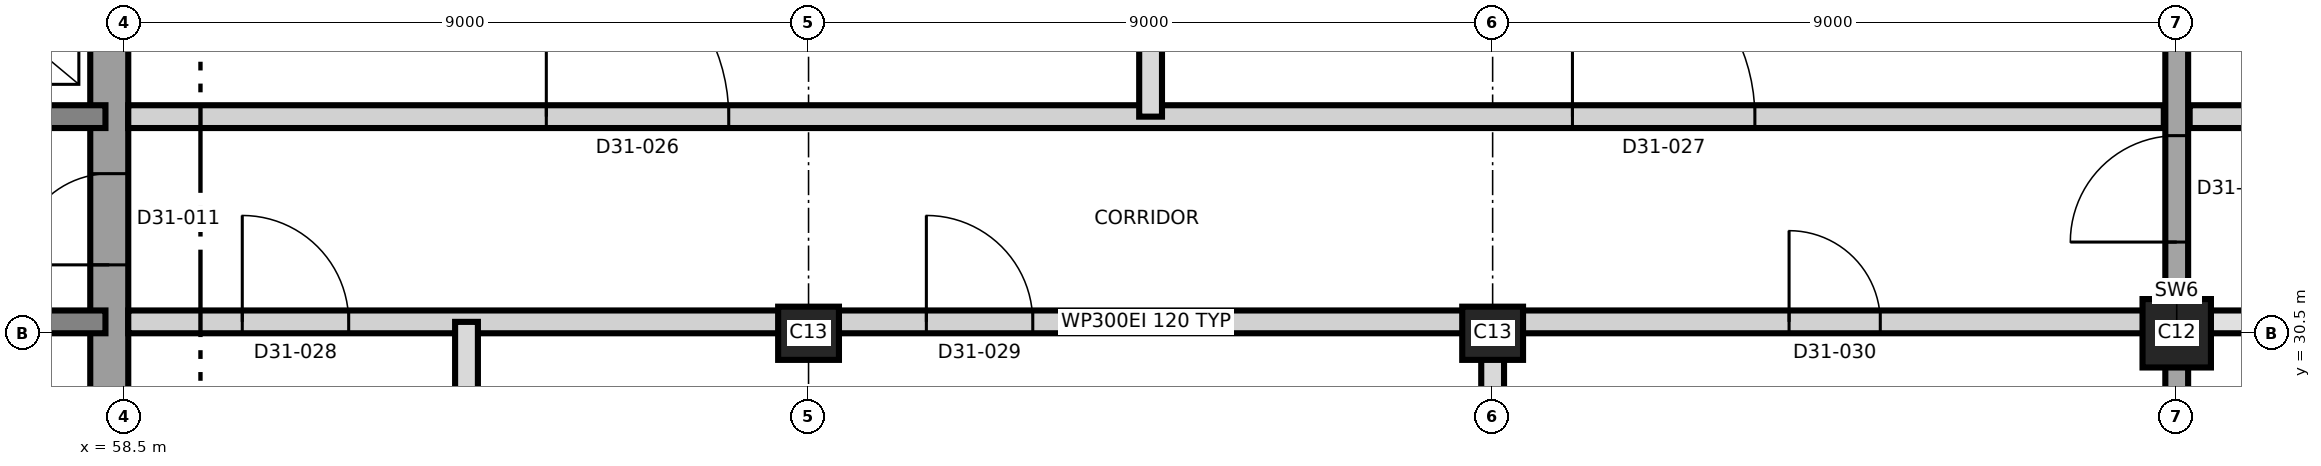
"""IFC4 building model, lengths in metres.
Left out: names, types, materials, properties, quantities, classifications, styles, units other than length and angle.
Written with IfcOpenShell. Run it as: python <this file> out.ifc"""

import sys

from ifc_helpers import new_model, si_unit, direction, frame, frame_2d, origin, origin_2d, place, context, subcontext, project, spatial, rectangle, extrude, element, fill, save


model = new_model("IFC4")
c1 = context("Model", 3, precision=1e-05, world=origin(), true_north=direction((0.0, 1.0)))
c2 = subcontext(c1, "Body", "Model", "MODEL_VIEW")
j1 = project(units=[si_unit("LENGTHUNIT", "METRE"), si_unit("PLANEANGLEUNIT", "RADIAN")], contexts=[c1])
p1 = place(None, origin())
s1 = spatial("IfcSite", under=j1, at=p1, CompositionType="ELEMENT")
p2 = place(p1, origin())
s2 = spatial("IfcBuilding", under=s1, at=p2, CompositionType="ELEMENT")
p3 = place(p2, frame((0.0, 0.0, 266.9)))
s3 = spatial("IfcBuildingStorey", under=s2, at=p3, CompositionType="ELEMENT", Elevation=266.9)
p4 = place(p3, frame((58.3, 21.25, 0.0), z_axis=(0.0, 0.0, 1.0), x_axis=(0.0, 1.0, 0.0)))
e1 = element("IfcWall", 1, at=p4, inside=s3, PredefinedType="SHEAR", context=c2, shape_type="SweptSolid", body=[
    extrude(rectangle(XDim=18.5, YDim=0.5, at=frame_2d((9.25, 0.0))), origin(), (0.0, 0.0, 1.0), 6.0),
])
p5 = place(p4, frame((10.15, 0.0, 0.0)))
e2 = element("IfcOpeningElement", 2, at=p5, cuts=e1, PredefinedType="OPENING", context=c2, shape_type="SweptSolid", body=[
    extrude(rectangle(XDim=1.2, YDim=2.1, at=frame_2d((0.6, 1.05))), frame((0.0, 0.26, 0.0), z_axis=(0.0, -1.0, 0.0), x_axis=(1.0, 0.0, 0.0)), (0.0, 0.0, 1.0), 0.52),
])
p6 = place(p3, frame((31.75, 30.65, 0.0), z_axis=(0.0, 0.0, 1.0), x_axis=(1.0, 0.0, 0.0)))
e3 = element("IfcWall", 3, at=p6, inside=s3, PredefinedType="SHEAR", context=c2, shape_type="SweptSolid", body=[
    extrude(rectangle(XDim=26.5, YDim=0.3, at=frame_2d((13.25, 0.0))), origin(), (0.0, 0.0, 1.0), 6.0),
])
p7 = place(p6, frame((24.75, 0.0, 0.0)))
e4 = element("IfcOpeningElement", 4, at=p7, cuts=e3, PredefinedType="OPENING", context=c2, shape_type="SweptSolid", body=[
    extrude(rectangle(XDim=1.0, YDim=2.1, at=frame_2d((0.5, 1.05))), frame((0.0, 0.16, 0.0), z_axis=(0.0, -1.0, 0.0), x_axis=(1.0, 0.0, 0.0)), (0.0, 0.0, 1.0), 0.32),
])
p8 = place(p6, frame((4.05, 0.0, 0.0)))
e5 = element("IfcOpeningElement", 5, at=p8, cuts=e3, PredefinedType="OPENING", context=c2, shape_type="SweptSolid", body=[
    extrude(rectangle(XDim=1.0, YDim=2.1, at=frame_2d((0.5, 1.05))), frame((0.0, 0.16, 0.0), z_axis=(0.0, -1.0, 0.0), x_axis=(1.0, 0.0, 0.0)), (0.0, 0.0, 1.0), 0.32),
])
p9 = place(p6, frame((11.55, 0.0, 0.0)))
e6 = element("IfcOpeningElement", 6, at=p9, cuts=e3, PredefinedType="OPENING", context=c2, shape_type="SweptSolid", body=[
    extrude(rectangle(XDim=1.0, YDim=2.1, at=frame_2d((0.5, 1.05))), frame((0.0, 0.16, 0.0), z_axis=(0.0, -1.0, 0.0), x_axis=(1.0, 0.0, 0.0)), (0.0, 0.0, 1.0), 0.32),
])
p10 = place(p3, frame((31.75, 33.35, 0.0), z_axis=(0.0, 0.0, 1.0), x_axis=(1.0, 0.0, 0.0)))
e7 = element("IfcWall", 7, at=p10, inside=s3, PredefinedType="SHEAR", context=c2, shape_type="SweptSolid", body=[
    extrude(rectangle(XDim=26.5, YDim=0.3, at=frame_2d((13.25, 0.0))), origin(), (0.0, 0.0, 1.0), 6.0),
])
p11 = place(p10, frame((13.9, 0.0, 0.0)))
e8 = element("IfcOpeningElement", 8, at=p11, cuts=e7, PredefinedType="OPENING", context=c2, shape_type="SweptSolid", body=[
    extrude(rectangle(XDim=1.4, YDim=2.1, at=frame_2d((0.7, 1.05))), frame((0.0, 0.16, 0.0), z_axis=(0.0, -1.0, 0.0), x_axis=(1.0, 0.0, 0.0)), (0.0, 0.0, 1.0), 0.32),
])
p12 = place(p10, frame((5.375, 0.0, 0.0)))
e9 = element("IfcOpeningElement", 9, at=p12, cuts=e7, PredefinedType="OPENING", context=c2, shape_type="SweptSolid", body=[
    extrude(rectangle(XDim=1.2, YDim=2.1, at=frame_2d((0.6, 1.05))), frame((0.0, 0.16, 0.0), z_axis=(0.0, -1.0, 0.0), x_axis=(1.0, 0.0, 0.0)), (0.0, 0.0, 1.0), 0.32),
])
p13 = place(p10, frame((19.925, 0.0, 0.0)))
e10 = element("IfcOpeningElement", 10, at=p13, cuts=e7, PredefinedType="OPENING", context=c2, shape_type="SweptSolid", body=[
    extrude(rectangle(XDim=1.2, YDim=2.1, at=frame_2d((0.6, 1.05))), frame((0.0, 0.16, 0.0), z_axis=(0.0, -1.0, 0.0), x_axis=(1.0, 0.0, 0.0)), (0.0, 0.0, 1.0), 0.32),
])
for number, where, z_axis, x_axis in (
    (11, (67.5, 30.5, 0.0), (0.0, 0.0, 1.0), (1.0, 0.0, 0.0)),
    (12, (76.5, 30.5, 0.0), (0.0, 0.0, 1.0), (1.0, 0.0, 0.0)),
):
    element("IfcColumn", number, at=place(p3, frame(where, z_axis=z_axis, x_axis=x_axis)), inside=s3, PredefinedType="COLUMN", context=c2, shape_type="SweptSolid", body=[
        extrude(rectangle(XDim=0.8, YDim=0.7, at=origin_2d()), origin(), (0.0, 0.0, 1.0), 6.0),
    ])
p14 = place(p3, frame((85.5, 30.5, 0.0), z_axis=(0.0, 0.0, 1.0), x_axis=(1.0, 0.0, 0.0)))
e13 = element("IfcColumn", 13, at=p14, inside=s3, PredefinedType="COLUMN", context=c2, shape_type="SweptSolid", body=[
    extrude(rectangle(XDim=0.9, YDim=0.9, at=origin_2d()), origin(), (0.0, 0.0, 1.0), 6.0),
])
p15 = place(p3, frame((85.5, 20.75, 0.0), z_axis=(0.0, 0.0, 1.0), x_axis=(0.0, 1.0, 0.0)))
e14 = element("IfcWall", 14, at=p15, inside=s3, PredefinedType="SHEAR", context=c2, shape_type="SweptSolid", body=[
    extrude(rectangle(XDim=19.5, YDim=0.3, at=frame_2d((9.75, 0.0))), origin(), (0.0, 0.0, 1.0), 6.0),
])
p16 = place(p15, frame((10.95, 0.0, 0.0)))
e15 = element("IfcOpeningElement", 15, at=p16, cuts=e14, PredefinedType="OPENING", context=c2, shape_type="SweptSolid", body=[
    extrude(rectangle(XDim=1.4, YDim=2.1, at=frame_2d((0.7, 1.05))), frame((0.0, 0.16, 0.0), z_axis=(0.0, -1.0, 0.0), x_axis=(1.0, 0.0, 0.0)), (0.0, 0.0, 1.0), 0.32),
])
p17 = place(p3, frame((58.55, 30.65, 0.0), z_axis=(0.0, 0.0, 1.0), x_axis=(1.0, 0.0, 0.0)))
e16 = element("IfcWall", 16, at=p17, inside=s3, PredefinedType="PARTITIONING", context=c2, shape_type="SweptSolid", body=[
    extrude(rectangle(XDim=26.78, YDim=0.3, at=frame_2d((13.39, 0.0))), origin(), (0.0, 0.0, 1.0), 5.7),
])
p18 = place(p17, frame((1.5, 0.0, 0.0)))
e17 = element("IfcOpeningElement", 17, at=p18, cuts=e16, PredefinedType="OPENING", context=c2, shape_type="SweptSolid", body=[
    extrude(rectangle(XDim=1.4, YDim=2.1, at=frame_2d((0.7, 1.05))), frame((0.0, 0.16, 0.0), z_axis=(0.0, -1.0, 0.0), x_axis=(1.0, 0.0, 0.0)), (0.0, 0.0, 1.0), 0.32),
])
p19 = place(p17, frame((10.5, 0.0, 0.0)))
e18 = element("IfcOpeningElement", 18, at=p19, cuts=e16, PredefinedType="OPENING", context=c2, shape_type="SweptSolid", body=[
    extrude(rectangle(XDim=1.4, YDim=2.1, at=frame_2d((0.7, 1.05))), frame((0.0, 0.16, 0.0), z_axis=(0.0, -1.0, 0.0), x_axis=(1.0, 0.0, 0.0)), (0.0, 0.0, 1.0), 0.32),
])
p20 = place(p17, frame((21.85, 0.0, 0.0)))
e19 = element("IfcOpeningElement", 19, at=p20, cuts=e16, PredefinedType="OPENING", context=c2, shape_type="SweptSolid", body=[
    extrude(rectangle(XDim=1.2, YDim=2.1, at=frame_2d((0.6, 1.05))), frame((0.0, 0.16, 0.0), z_axis=(0.0, -1.0, 0.0), x_axis=(1.0, 0.0, 0.0)), (0.0, 0.0, 1.0), 0.32),
])
p21 = place(p3, frame((85.67, 30.65, 0.0), z_axis=(0.0, 0.0, 1.0), x_axis=(1.0, 0.0, 0.0)))
e20 = element("IfcWall", 20, at=p21, inside=s3, PredefinedType="SOLIDWALL", context=c2, shape_type="SweptSolid", body=[
    extrude(rectangle(XDim=9.76, YDim=0.3, at=frame_2d((4.88, 0.0))), origin(), (0.0, 0.0, 1.0), 5.7),
])
p22 = place(p21, frame((2.08, 0.0, 0.0)))
e21 = element("IfcOpeningElement", 21, at=p22, cuts=e20, PredefinedType="OPENING", context=c2, shape_type="SweptSolid", body=[
    extrude(rectangle(XDim=1.2, YDim=2.1, at=frame_2d((0.6, 1.05))), frame((0.0, 0.16, 0.0), z_axis=(0.0, -1.0, 0.0), x_axis=(1.0, 0.0, 0.0)), (0.0, 0.0, 1.0), 0.32),
])
p23 = place(p21, frame((5.63, 0.0, 0.0)))
e22 = element("IfcOpeningElement", 22, at=p23, cuts=e20, PredefinedType="OPENING", context=c2, shape_type="SweptSolid", body=[
    extrude(rectangle(XDim=1.0, YDim=2.1, at=frame_2d((0.5, 1.05))), frame((0.0, 0.16, 0.0), z_axis=(0.0, -1.0, 0.0), x_axis=(1.0, 0.0, 0.0)), (0.0, 0.0, 1.0), 0.32),
])
p24 = place(p3, frame((58.55, 33.35, 0.0), z_axis=(0.0, 0.0, 1.0), x_axis=(1.0, 0.0, 0.0)))
e23 = element("IfcWall", 23, at=p24, inside=s3, PredefinedType="PARTITIONING", context=c2, shape_type="SweptSolid", body=[
    extrude(rectangle(XDim=26.78, YDim=0.3, at=frame_2d((13.39, 0.0))), origin(), (0.0, 0.0, 1.0), 5.7),
])
p25 = place(p24, frame((5.5, 0.0, 0.0)))
e24 = element("IfcOpeningElement", 24, at=p25, cuts=e23, PredefinedType="OPENING", context=c2, shape_type="SweptSolid", body=[
    extrude(rectangle(XDim=2.4, YDim=2.4, at=frame_2d((1.2, 1.2))), frame((0.0, 0.16, 0.0), z_axis=(0.0, -1.0, 0.0), x_axis=(1.0, 0.0, 0.0)), (0.0, 0.0, 1.0), 0.32),
])
p26 = place(p24, frame((19.0, 0.0, 0.0)))
e25 = element("IfcOpeningElement", 25, at=p26, cuts=e23, PredefinedType="OPENING", context=c2, shape_type="SweptSolid", body=[
    extrude(rectangle(XDim=2.4, YDim=2.4, at=frame_2d((1.2, 1.2))), frame((0.0, 0.16, 0.0), z_axis=(0.0, -1.0, 0.0), x_axis=(1.0, 0.0, 0.0)), (0.0, 0.0, 1.0), 0.32),
])
p27 = place(p3, frame((85.67, 33.35, 0.0), z_axis=(0.0, 0.0, 1.0), x_axis=(1.0, 0.0, 0.0)))
e26 = element("IfcWall", 26, at=p27, inside=s3, PredefinedType="PARTITIONING", context=c2, shape_type="SweptSolid", body=[
    extrude(rectangle(XDim=9.724, YDim=0.3, at=frame_2d((4.862, 0.0))), origin(), (0.0, 0.0, 1.0), 5.7),
])
p28 = place(p27, frame((1.83, 0.0, 0.0)))
e27 = element("IfcOpeningElement", 27, at=p28, cuts=e26, PredefinedType="OPENING", context=c2, shape_type="SweptSolid", body=[
    extrude(rectangle(XDim=1.0, YDim=2.1, at=frame_2d((0.5, 1.05))), frame((0.0, 0.16, 0.0), z_axis=(0.0, -1.0, 0.0), x_axis=(1.0, 0.0, 0.0)), (0.0, 0.0, 1.0), 0.32),
])
p29 = place(p27, frame((5.63, 0.0, 0.0)))
e28 = element("IfcOpeningElement", 28, at=p29, cuts=e26, PredefinedType="OPENING", context=c2, shape_type="SweptSolid", body=[
    extrude(rectangle(XDim=1.0, YDim=2.1, at=frame_2d((0.5, 1.05))), frame((0.0, 0.16, 0.0), z_axis=(0.0, -1.0, 0.0), x_axis=(1.0, 0.0, 0.0)), (0.0, 0.0, 1.0), 0.32),
])
p30 = place(p3, frame((63.0, 20.57, 0.0), z_axis=(0.0, 0.0, 1.0), x_axis=(0.0, 1.0, 0.0)))
e29 = element("IfcWall", 29, at=p30, inside=s3, PredefinedType="PARTITIONING", context=c2, shape_type="SweptSolid", body=[
    extrude(rectangle(XDim=10.08, YDim=0.3, at=frame_2d((5.04, 0.0))), origin(), (0.0, 0.0, 1.0), 5.7),
])
p31 = place(p3, frame((72.0, 33.35, 0.0), z_axis=(0.0, 0.0, 1.0), x_axis=(0.0, 1.0, 0.0)))
e30 = element("IfcWall", 30, at=p31, inside=s3, PredefinedType="PARTITIONING", context=c2, shape_type="SweptSolid", body=[
    extrude(rectangle(XDim=7.08, YDim=0.3, at=frame_2d((3.54, 0.0))), origin(), (0.0, 0.0, 1.0), 5.7),
])
p32 = place(p3, frame((76.5, 20.57, 0.0), z_axis=(0.0, 0.0, 1.0), x_axis=(0.0, 1.0, 0.0)))
e31 = element("IfcWall", 31, at=p32, inside=s3, PredefinedType="PARTITIONING", context=c2, shape_type="SweptSolid", body=[
    extrude(rectangle(XDim=10.08, YDim=0.3, at=frame_2d((5.04, 0.0))), origin(), (0.0, 0.0, 1.0), 5.7),
])
p33 = place(p5, origin())
e32 = element("IfcDoor", 32, at=p33, inside=s3, OperationType="SINGLE_SWING_LEFT", PredefinedType="DOOR", context=c2, shape_type="SweptSolid", body=[
    extrude(rectangle(XDim=1.2, YDim=2.1, at=frame_2d((0.6, 1.05))), frame((0.0, 0.025, 0.0), z_axis=(0.0, -1.0, 0.0), x_axis=(1.0, 0.0, 0.0)), (0.0, 0.0, 1.0), 0.05),
])
fill(e2, e32)
p34 = place(p25, origin())
e33 = element("IfcDoor", 33, at=p34, inside=s3, OperationType="SINGLE_SWING_LEFT", PredefinedType="DOOR", context=c2, shape_type="SweptSolid", body=[
    extrude(rectangle(XDim=2.4, YDim=2.4, at=frame_2d((1.2, 1.2))), frame((0.0, 0.025, 0.0), z_axis=(0.0, -1.0, 0.0), x_axis=(1.0, 0.0, 0.0)), (0.0, 0.0, 1.0), 0.05),
])
fill(e24, e33)
p35 = place(p26, origin())
e34 = element("IfcDoor", 34, at=p35, inside=s3, OperationType="SINGLE_SWING_LEFT", PredefinedType="DOOR", context=c2, shape_type="SweptSolid", body=[
    extrude(rectangle(XDim=2.4, YDim=2.4, at=frame_2d((1.2, 1.2))), frame((0.0, 0.025, 0.0), z_axis=(0.0, -1.0, 0.0), x_axis=(1.0, 0.0, 0.0)), (0.0, 0.0, 1.0), 0.05),
])
fill(e25, e34)
p36 = place(p18, origin())
e35 = element("IfcDoor", 35, at=p36, inside=s3, OperationType="SINGLE_SWING_LEFT", PredefinedType="DOOR", context=c2, shape_type="SweptSolid", body=[
    extrude(rectangle(XDim=1.4, YDim=2.1, at=frame_2d((0.7, 1.05))), frame((0.0, 0.025, 0.0), z_axis=(0.0, -1.0, 0.0), x_axis=(1.0, 0.0, 0.0)), (0.0, 0.0, 1.0), 0.05),
])
fill(e17, e35)
p37 = place(p19, origin())
e36 = element("IfcDoor", 36, at=p37, inside=s3, OperationType="SINGLE_SWING_LEFT", PredefinedType="DOOR", context=c2, shape_type="SweptSolid", body=[
    extrude(rectangle(XDim=1.4, YDim=2.1, at=frame_2d((0.7, 1.05))), frame((0.0, 0.025, 0.0), z_axis=(0.0, -1.0, 0.0), x_axis=(1.0, 0.0, 0.0)), (0.0, 0.0, 1.0), 0.05),
])
fill(e18, e36)
p38 = place(p20, origin())
e37 = element("IfcDoor", 37, at=p38, inside=s3, OperationType="SINGLE_SWING_LEFT", PredefinedType="DOOR", context=c2, shape_type="SweptSolid", body=[
    extrude(rectangle(XDim=1.2, YDim=2.1, at=frame_2d((0.6, 1.05))), frame((0.0, 0.025, 0.0), z_axis=(0.0, -1.0, 0.0), x_axis=(1.0, 0.0, 0.0)), (0.0, 0.0, 1.0), 0.05),
])
fill(e19, e37)
p39 = place(p16, origin())
e38 = element("IfcDoor", 38, at=p39, inside=s3, OperationType="SINGLE_SWING_RIGHT", PredefinedType="DOOR", context=c2, shape_type="SweptSolid", body=[
    extrude(rectangle(XDim=1.4, YDim=2.1, at=frame_2d((0.7, 1.05))), frame((0.0, 0.025, 0.0), z_axis=(0.0, -1.0, 0.0), x_axis=(1.0, 0.0, 0.0)), (0.0, 0.0, 1.0), 0.05),
])
fill(e15, e38)
save(model, sys.argv[1])
